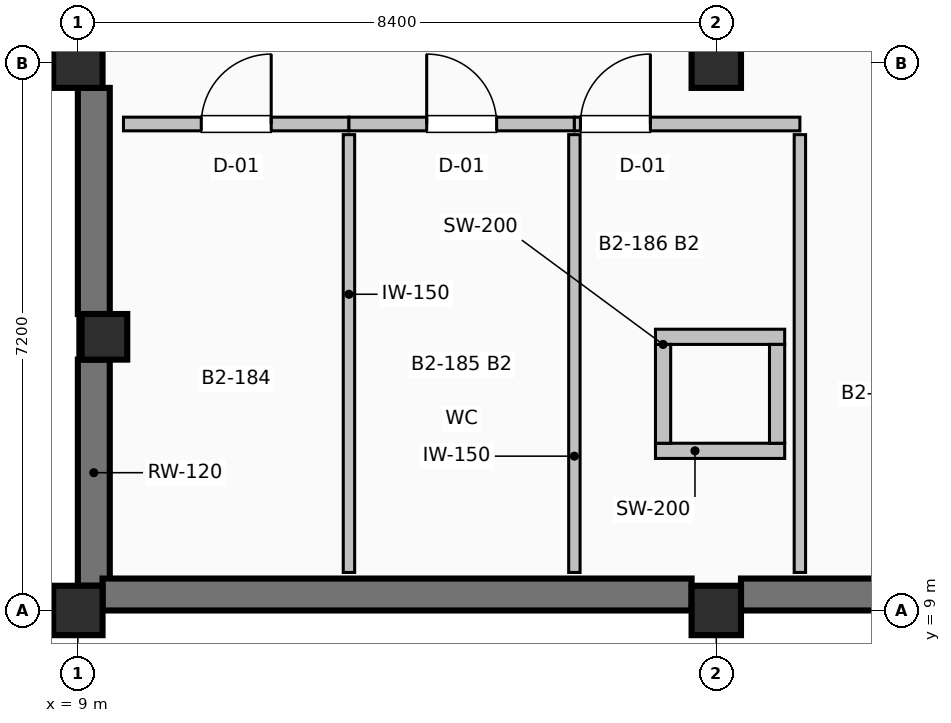
"""IFC4 building model, lengths in metres.
Left out: names, types, materials, properties, quantities, classifications, styles, units other than length and angle.
Written with IfcOpenShell. Run it as: python <this file> out.ifc"""

import sys

from ifc_helpers import new_model, si_unit, direction, frame, frame_2d, origin, origin_2d, place, context, subcontext, project, spatial, rectangle, extrude, element, fill, save


model = new_model("IFC4")
c1 = context("Model", 3, precision=1e-05, world=origin(), true_north=direction((0.0, 1.0)))
c2 = subcontext(c1, "Body", "Model", "MODEL_VIEW")
j1 = project(units=[si_unit("LENGTHUNIT", "METRE"), si_unit("PLANEANGLEUNIT", "RADIAN")], contexts=[c1])
p1 = place(None, origin())
s1 = spatial("IfcSite", under=j1, at=p1, CompositionType="ELEMENT")
p2 = place(p1, origin())
s2 = spatial("IfcBuilding", under=s1, at=p2, CompositionType="ELEMENT")
p3 = place(p2, frame((0.0, 0.0, -9.6)))
s3 = spatial("IfcBuildingStorey", under=s2, at=p3, CompositionType="ELEMENT", Elevation=-9.6)
for number, where, z_axis, x_axis in (
    (1, (9.0, 9.0, 0.0), (0.0, 0.0, 1.0), (1.0, 0.0, 0.0)),
    (2, (9.0, 16.2, 0.0), (0.0, 0.0, 1.0), (1.0, 0.0, 0.0)),
    (3, (17.4, 9.0, 0.0), (0.0, 0.0, 1.0), (1.0, 0.0, 0.0)),
    (4, (17.4, 16.2, 0.0), (0.0, 0.0, 1.0), (1.0, 0.0, 0.0)),
):
    element("IfcColumn", number, at=place(p3, frame(where, z_axis=z_axis, x_axis=x_axis)), inside=s3, PredefinedType="COLUMN", context=c2, shape_type="SweptSolid", body=[
        extrude(rectangle(XDim=0.65, YDim=0.65, at=origin_2d()), origin(), (0.0, 0.0, 1.0), 4.8),
    ])
p4 = place(p3, frame((9.35, 12.6, 0.0), z_axis=(0.0, 0.0, 1.0), x_axis=(1.0, 0.0, 0.0)))
e5 = element("IfcColumn", 5, at=p4, inside=s3, PredefinedType="COLUMN", context=c2, shape_type="SweptSolid", body=[
    extrude(rectangle(XDim=0.6, YDim=0.6, at=origin_2d()), origin(), (0.0, 0.0, 1.0), 4.8),
])
for number, where, z_axis, x_axis in (
    (6, (9.21, 9.325, 0.0), (0.0, 0.0, 1.0), (0.0, 1.0, 0.0)),
    (7, (9.21, 12.9, 0.0), (0.0, 0.0, 1.0), (0.0, 1.0, 0.0)),
):
    element("IfcWall", number, at=place(p3, frame(where, z_axis=z_axis, x_axis=x_axis)), inside=s3, PredefinedType="SHEAR", context=c2, shape_type="SweptSolid", body=[
        extrude(rectangle(XDim=2.975, YDim=0.42, at=frame_2d((1.488, 0.0))), origin(), (0.0, 0.0, 1.0), 4.5),
    ])
for number, where, z_axis, x_axis in (
    (8, (25.475, 9.21, 0.0), (0.0, 0.0, 1.0), (-1.0, 0.0, 0.0)),
    (9, (17.075, 9.21, 0.0), (0.0, 0.0, 1.0), (-1.0, 0.0, 0.0)),
):
    element("IfcWall", number, at=place(p3, frame(where, z_axis=z_axis, x_axis=x_axis)), inside=s3, PredefinedType="SHEAR", context=c2, shape_type="SweptSolid", body=[
        extrude(rectangle(XDim=7.75, YDim=0.42, at=frame_2d((3.875, 0.0))), origin(), (0.0, 0.0, 1.0), 4.5),
    ])
for number, where, z_axis, x_axis in (
    (10, (16.6, 11.1, 0.0), (0.0, 0.0, 1.0), (1.0, 0.0, 0.0)),
    (11, (18.3, 12.6, 0.0), (0.0, 0.0, 1.0), (-1.0, 0.0, 0.0)),
):
    element("IfcWall", number, at=place(p3, frame(where, z_axis=z_axis, x_axis=x_axis)), inside=s3, PredefinedType="PARTITIONING", context=c2, shape_type="SweptSolid", body=[
        extrude(rectangle(XDim=1.7, YDim=0.2, at=frame_2d((0.85, 0.0))), origin(), (0.0, 0.0, 1.0), 4.5),
    ])
for number, where, z_axis, x_axis in (
    (12, (16.7, 11.2, 0.0), (0.0, 0.0, 1.0), (0.0, 1.0, 0.0)),
    (13, (18.2, 12.5, 0.0), (0.0, 0.0, 1.0), (0.0, -1.0, 0.0)),
):
    element("IfcWall", number, at=place(p3, frame(where, z_axis=z_axis, x_axis=x_axis)), inside=s3, PredefinedType="PARTITIONING", context=c2, shape_type="SweptSolid", body=[
        extrude(rectangle(XDim=1.3, YDim=0.2, at=frame_2d((0.65, 0.0))), origin(), (0.0, 0.0, 1.0), 4.5),
    ])
p5 = place(p3, frame((9.6, 15.4, 0.0), z_axis=(0.0, 0.0, 1.0), x_axis=(1.0, 0.0, 0.0)))
e14 = element("IfcWall", 14, at=p5, inside=s3, PredefinedType="PARTITIONING", context=c2, shape_type="SweptSolid", body=[
    extrude(rectangle(XDim=2.967, YDim=0.18, at=frame_2d((1.483, 0.0))), origin(), (0.0, 0.0, 1.0), 4.492),
])
p6 = place(p5, frame((1.024, 0.0, 0.0)))
e15 = element("IfcOpeningElement", 15, at=p6, cuts=e14, PredefinedType="OPENING", context=c2, shape_type="SweptSolid", body=[
    extrude(rectangle(XDim=0.92, YDim=2.05, at=frame_2d((0.46, 1.025))), frame((0.0, 0.1, 0.0), z_axis=(0.0, -1.0, 0.0), x_axis=(1.0, 0.0, 0.0)), (0.0, 0.0, 1.0), 0.2),
])
p7 = place(p3, frame((12.567, 9.5, 0.0), z_axis=(0.0, 0.0, 1.0), x_axis=(0.0, 1.0, 0.0)))
e16 = element("IfcWall", 16, at=p7, inside=s3, PredefinedType="PARTITIONING", context=c2, shape_type="SweptSolid", body=[
    extrude(rectangle(XDim=5.76, YDim=0.15, at=frame_2d((2.88, 0.0))), origin(), (0.0, 0.0, 1.0), 4.492),
])
p8 = place(p3, frame((12.567, 15.4, 0.0), z_axis=(0.0, 0.0, 1.0), x_axis=(1.0, 0.0, 0.0)))
e17 = element("IfcWall", 17, at=p8, inside=s3, PredefinedType="PARTITIONING", context=c2, shape_type="SweptSolid", body=[
    extrude(rectangle(XDim=2.966, YDim=0.18, at=frame_2d((1.483, 0.0))), origin(), (0.0, 0.0, 1.0), 4.492),
])
p9 = place(p8, frame((1.023, 0.0, 0.0)))
e18 = element("IfcOpeningElement", 18, at=p9, cuts=e17, PredefinedType="OPENING", context=c2, shape_type="SweptSolid", body=[
    extrude(rectangle(XDim=0.92, YDim=2.05, at=frame_2d((0.46, 1.025))), frame((0.0, 0.1, 0.0), z_axis=(0.0, -1.0, 0.0), x_axis=(1.0, 0.0, 0.0)), (0.0, 0.0, 1.0), 0.2),
])
for number, where, z_axis, x_axis in (
    (19, (15.533, 9.5, 0.0), (0.0, 0.0, 1.0), (0.0, 1.0, 0.0)),
    (20, (18.5, 9.5, 0.0), (0.0, 0.0, 1.0), (0.0, 1.0, 0.0)),
):
    element("IfcWall", number, at=place(p3, frame(where, z_axis=z_axis, x_axis=x_axis)), inside=s3, PredefinedType="PARTITIONING", context=c2, shape_type="SweptSolid", body=[
        extrude(rectangle(XDim=5.76, YDim=0.15, at=frame_2d((2.88, 0.0))), origin(), (0.0, 0.0, 1.0), 4.492),
    ])
p10 = place(p3, frame((15.533, 15.4, 0.0), z_axis=(0.0, 0.0, 1.0), x_axis=(1.0, 0.0, 0.0)))
e21 = element("IfcWall", 21, at=p10, inside=s3, PredefinedType="PARTITIONING", context=c2, shape_type="SweptSolid", body=[
    extrude(rectangle(XDim=2.967, YDim=0.18, at=frame_2d((1.483, 0.0))), origin(), (0.0, 0.0, 1.0), 4.492),
])
p11 = place(p10, frame((0.08, 0.0, 0.0)))
e22 = element("IfcOpeningElement", 22, at=p11, cuts=e21, PredefinedType="OPENING", context=c2, shape_type="SweptSolid", body=[
    extrude(rectangle(XDim=0.92, YDim=2.05, at=frame_2d((0.46, 1.025))), frame((0.0, 0.1, 0.0), z_axis=(0.0, -1.0, 0.0), x_axis=(1.0, 0.0, 0.0)), (0.0, 0.0, 1.0), 0.2),
])
p12 = place(p6, origin())
e23 = element("IfcDoor", 23, at=p12, inside=s3, OperationType="SINGLE_SWING_RIGHT", PredefinedType="DOOR", context=c2, shape_type="SweptSolid", body=[
    extrude(rectangle(XDim=0.92, YDim=2.05, at=frame_2d((0.46, 1.025))), frame((0.0, 0.025, 0.0), z_axis=(0.0, -1.0, 0.0), x_axis=(1.0, 0.0, 0.0)), (0.0, 0.0, 1.0), 0.05),
])
fill(e15, e23)
p13 = place(p9, origin())
e24 = element("IfcDoor", 24, at=p13, inside=s3, OperationType="SINGLE_SWING_LEFT", PredefinedType="DOOR", context=c2, shape_type="SweptSolid", body=[
    extrude(rectangle(XDim=0.92, YDim=2.05, at=frame_2d((0.46, 1.025))), frame((0.0, 0.025, 0.0), z_axis=(0.0, -1.0, 0.0), x_axis=(1.0, 0.0, 0.0)), (0.0, 0.0, 1.0), 0.05),
])
fill(e18, e24)
p14 = place(p11, origin())
e25 = element("IfcDoor", 25, at=p14, inside=s3, OperationType="SINGLE_SWING_RIGHT", PredefinedType="DOOR", context=c2, shape_type="SweptSolid", body=[
    extrude(rectangle(XDim=0.92, YDim=2.05, at=frame_2d((0.46, 1.025))), frame((0.0, 0.025, 0.0), z_axis=(0.0, -1.0, 0.0), x_axis=(1.0, 0.0, 0.0)), (0.0, 0.0, 1.0), 0.05),
])
fill(e22, e25)
save(model, sys.argv[1])
